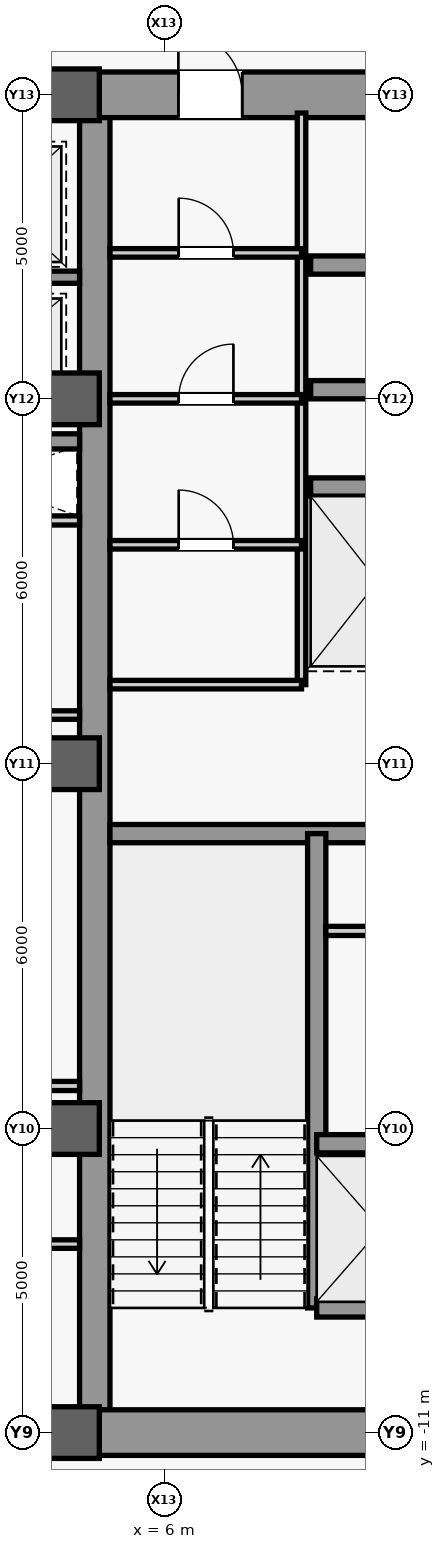
"""IFC4 building model, lengths in metres.
Left out: names, types, materials, properties, quantities, classifications, styles, units other than length and angle.
Written with IfcOpenShell. Run it as: python <this file> out.ifc"""

import sys

from ifc_helpers import new_model, si_unit, direction, frame, frame_2d, origin, origin_2d, place, context, subcontext, project, spatial, rectangle, extrude, source, transform, mapped, element, fill, save


model = new_model("IFC4")
c1 = context("Model", 3, precision=1e-05, world=origin(), true_north=direction((0.0, 1.0)))
c2 = subcontext(c1, "Body", "Model", "MODEL_VIEW")
j1 = project(units=[si_unit("LENGTHUNIT", "METRE"), si_unit("PLANEANGLEUNIT", "RADIAN")], contexts=[c1])
p1 = place(None, origin())
s1 = spatial("IfcSite", under=j1, at=p1, CompositionType="ELEMENT")
p2 = place(p1, origin())
s2 = spatial("IfcBuilding", under=s1, at=p2, CompositionType="ELEMENT")
p3 = place(p2, frame((0.0, 0.0, 155.1)))
s3 = spatial("IfcBuildingStorey", under=s2, at=p3, CompositionType="ELEMENT", Elevation=155.1)
m1 = source(origin(), c2, "Body", "SweptSolid", [
    extrude(rectangle(XDim=21.4, YDim=0.5, at=frame_2d((10.7, 0.0))), origin(), (0.0, 0.0, 1.0), 3.78),
])
p4 = place(p3, frame((4.85, -10.7, 0.0), z_axis=(0.0, 0.0, 1.0), x_axis=(0.0, 1.0, 0.0)))
e1 = element("IfcWall", 1, at=p4, inside=s3, PredefinedType="SHEAR", context=c2, shape_type="MappedRepresentation", body=[
    mapped(m1, transform((0.0, 0.0, 0.0), scale=1.0)),
])
m2 = source(origin(), c2, "Body", "SweptSolid", [
    extrude(rectangle(XDim=5.85, YDim=0.75, at=frame_2d((2.925, 0.0))), origin(), (0.0, 0.0, 1.0), 3.78),
])
p5 = place(p3, frame((4.85, -11.0, 0.0), z_axis=(0.0, 0.0, 1.0), x_axis=(1.0, 0.0, 0.0)))
e2 = element("IfcWall", 2, at=p5, inside=s3, PredefinedType="SHEAR", context=c2, shape_type="MappedRepresentation", body=[
    mapped(m2, transform((0.0, 0.0, 0.0), scale=1.0)),
])
p6 = place(p3, frame((4.85, 11.0, 0.0), z_axis=(0.0, 0.0, 1.0), x_axis=(1.0, 0.0, 0.0)))
e3 = element("IfcWall", 3, at=p6, inside=s3, PredefinedType="SHEAR", context=c2, shape_type="MappedRepresentation", body=[
    mapped(m2, transform((0.0, 0.0, 0.0), scale=1.0)),
])
m3 = source(origin(), c2, "Body", "SweptSolid", [
    extrude(rectangle(XDim=1.05, YDim=2.2, at=frame_2d((0.525, 1.1))), frame((0.0, 0.385, 0.0), z_axis=(0.0, -1.0, 0.0), x_axis=(1.0, 0.0, 0.0)), (0.0, 0.0, 1.0), 0.77),
])
p7 = place(p6, frame((1.375, 0.0, 0.0)))
e4 = element("IfcOpeningElement", 4, at=p7, cuts=e3, PredefinedType="OPENING", context=c2, shape_type="MappedRepresentation", body=[
    mapped(m3, transform((0.0, 0.0, 0.0), scale=1.0)),
])
m4 = source(origin(), c2, "Body", "SweptSolid", [
    extrude(rectangle(XDim=5.6, YDim=0.3, at=frame_2d((2.8, 0.0))), origin(), (0.0, 0.0, 1.0), 3.78),
])
p8 = place(p3, frame((5.1, -1.15, 0.0), z_axis=(0.0, 0.0, 1.0), x_axis=(1.0, 0.0, 0.0)))
e5 = element("IfcWall", 5, at=p8, inside=s3, PredefinedType="SHEAR", context=c2, shape_type="MappedRepresentation", body=[
    mapped(m4, transform((0.0, 0.0, 0.0), scale=1.0)),
])
m5 = source(origin(), c2, "Body", "SweptSolid", [
    extrude(rectangle(XDim=9.2, YDim=0.5, at=frame_2d((4.6, 0.0))), origin(), (0.0, 0.0, 1.0), 3.78),
])
p9 = place(p3, frame((-4.6, -11.0, 0.0), z_axis=(0.0, 0.0, 1.0), x_axis=(1.0, 0.0, 0.0)))
e6 = element("IfcWall", 6, at=p9, inside=s3, PredefinedType="SHEAR", context=c2, shape_type="MappedRepresentation", body=[
    mapped(m5, transform((0.0, 0.0, 0.0), scale=1.0)),
])
m6 = source(origin(), c2, "Body", "SweptSolid", [
    extrude(rectangle(XDim=1.8, YDim=2.25, at=frame_2d((0.9, 1.125))), frame((0.0, 0.26, 0.0), z_axis=(0.0, -1.0, 0.0), x_axis=(1.0, 0.0, 0.0)), (0.0, 0.0, 1.0), 0.52),
])
p10 = place(p9, frame((3.7, 0.0, 0.0)))
e7 = element("IfcOpeningElement", 7, at=p10, cuts=e6, PredefinedType="OPENING", context=c2, shape_type="MappedRepresentation", body=[
    mapped(m6, transform((0.0, 0.0, 0.0), scale=1.0)),
])
p11 = place(p3, frame((-4.6, 11.0, 0.0), z_axis=(0.0, 0.0, 1.0), x_axis=(1.0, 0.0, 0.0)))
e8 = element("IfcWall", 8, at=p11, inside=s3, PredefinedType="SHEAR", context=c2, shape_type="MappedRepresentation", body=[
    mapped(m5, transform((0.0, 0.0, 0.0), scale=1.0)),
])
p12 = place(p11, frame((3.7, 0.0, 0.0)))
e9 = element("IfcOpeningElement", 9, at=p12, cuts=e8, PredefinedType="OPENING", context=c2, shape_type="MappedRepresentation", body=[
    mapped(m6, transform((0.0, 0.0, 0.0), scale=1.0)),
])
m7 = source(origin(), c2, "Body", "SweptSolid", [
    extrude(rectangle(XDim=0.85, YDim=0.85, at=origin_2d()), origin(), (0.0, 0.0, 1.0), 4.0),
])
for number, where, z_axis, x_axis in (
    (10, (4.5, -11.0, 0.0), (0.0, 0.0, 1.0), (1.0, 0.0, 0.0)),
    (11, (4.5, -6.0, 0.0), (0.0, 0.0, 1.0), (1.0, 0.0, 0.0)),
    (12, (4.5, 0.0, 0.0), (0.0, 0.0, 1.0), (1.0, 0.0, 0.0)),
    (13, (4.5, 6.0, 0.0), (0.0, 0.0, 1.0), (1.0, 0.0, 0.0)),
    (14, (4.5, 11.0, 0.0), (0.0, 0.0, 1.0), (1.0, 0.0, 0.0)),
):
    element("IfcColumn", number, at=place(p3, frame(where, z_axis=z_axis, x_axis=x_axis)), inside=s3, PredefinedType="COLUMN", context=c2, shape_type="MappedRepresentation", body=[
        mapped(m7, transform((0.0, 0.0, 0.0), scale=1.0)),
    ])
m8 = source(origin(), c2, "Body", "SweptSolid", [
    extrude(rectangle(XDim=7.8, YDim=0.3, at=frame_2d((3.9, 0.0))), origin(), (0.0, 0.0, 1.0), 3.78),
])
p13 = place(p3, frame((8.5, -8.95, 0.0), z_axis=(0.0, 0.0, 1.0), x_axis=(0.0, 1.0, 0.0)))
e15 = element("IfcWall", 15, at=p13, inside=s3, PredefinedType="SHEAR", context=c2, shape_type="MappedRepresentation", body=[
    mapped(m8, transform((0.0, 0.0, 0.0), scale=1.0)),
])
m9 = source(origin(), c2, "Body", "SweptSolid", [
    extrude(rectangle(XDim=2.2, YDim=0.3, at=frame_2d((1.1, 0.0))), origin(), (0.0, 0.0, 1.0), 3.78),
])
for number, where, z_axis, x_axis in (
    (16, (8.5, -8.95, 0.0), (0.0, 0.0, 1.0), (1.0, 0.0, 0.0)),
    (17, (8.5, -6.25, 0.0), (0.0, 0.0, 1.0), (1.0, 0.0, 0.0)),
):
    element("IfcWall", number, at=place(p3, frame(where, z_axis=z_axis, x_axis=x_axis)), inside=s3, PredefinedType="SHEAR", context=c2, shape_type="MappedRepresentation", body=[
        mapped(m9, transform((0.0, 0.0, 0.0), scale=1.0)),
    ])
m10 = source(origin(), c2, "Body", "SweptSolid", [
    extrude(rectangle(XDim=2.3, YDim=0.3, at=frame_2d((1.15, 0.0))), origin(), (0.0, 0.0, 1.0), 3.78),
])
for number, where, z_axis, x_axis in (
    (18, (8.4, 4.55, 0.0), (0.0, 0.0, 1.0), (1.0, 0.0, 0.0)),
    (19, (8.4, 6.15, 0.0), (0.0, 0.0, 1.0), (1.0, 0.0, 0.0)),
    (20, (8.4, 8.2, 0.0), (0.0, 0.0, 1.0), (1.0, 0.0, 0.0)),
):
    element("IfcWall", number, at=place(p3, frame(where, z_axis=z_axis, x_axis=x_axis)), inside=s3, PredefinedType="SHEAR", context=c2, shape_type="MappedRepresentation", body=[
        mapped(m10, transform((0.0, 0.0, 0.0), scale=1.0)),
    ])
m11 = source(origin(), c2, "Body", "SweptSolid", [
    extrude(rectangle(XDim=2.05, YDim=0.15, at=frame_2d((1.025, 0.0))), origin(), (0.0, 0.0, 1.0), 3.78),
])
p14 = place(p3, frame((8.65, -2.75, 0.0), z_axis=(0.0, 0.0, 1.0), x_axis=(1.0, 0.0, 0.0)))
e21 = element("IfcWall", 21, at=p14, inside=s3, PredefinedType="PARTITIONING", context=c2, shape_type="MappedRepresentation", body=[
    mapped(m11, transform((0.0, 0.0, 0.0), scale=1.0)),
])
m12 = source(origin(), c2, "Body", "SweptSolid", [
    extrude(rectangle(XDim=9.4, YDim=0.14, at=frame_2d((4.7, 0.0))), origin(), (0.0, 0.0, 1.0), 3.78),
])
p15 = place(p3, frame((8.25, 1.3, 0.0), z_axis=(0.0, 0.0, 1.0), x_axis=(0.0, 1.0, 0.0)))
e22 = element("IfcWall", 22, at=p15, inside=s3, PredefinedType="PARTITIONING", context=c2, shape_type="MappedRepresentation", body=[
    mapped(m12, transform((0.0, 0.0, 0.0), scale=1.0)),
])
m13 = source(origin(), c2, "Body", "SweptSolid", [
    extrude(rectangle(XDim=3.15, YDim=0.14, at=frame_2d((1.575, 0.0))), origin(), (0.0, 0.0, 1.0), 3.78),
])
p16 = place(p3, frame((5.1, 1.3, 0.0), z_axis=(0.0, 0.0, 1.0), x_axis=(1.0, 0.0, 0.0)))
e23 = element("IfcWall", 23, at=p16, inside=s3, PredefinedType="PARTITIONING", context=c2, shape_type="MappedRepresentation", body=[
    mapped(m13, transform((0.0, 0.0, 0.0), scale=1.0)),
])
p17 = place(p3, frame((5.1, 8.4, 0.0), z_axis=(0.0, 0.0, 1.0), x_axis=(1.0, 0.0, 0.0)))
e24 = element("IfcWall", 24, at=p17, inside=s3, PredefinedType="PARTITIONING", context=c2, shape_type="MappedRepresentation", body=[
    mapped(m13, transform((0.0, 0.0, 0.0), scale=1.0)),
])
m14 = source(origin(), c2, "Body", "SweptSolid", [
    extrude(rectangle(XDim=0.9, YDim=2.15, at=frame_2d((0.45, 1.075))), frame((0.0, 0.08, 0.0), z_axis=(0.0, -1.0, 0.0), x_axis=(1.0, 0.0, 0.0)), (0.0, 0.0, 1.0), 0.16),
])
p18 = place(p17, frame((1.13, 0.0, 0.0)))
e25 = element("IfcOpeningElement", 25, at=p18, cuts=e24, PredefinedType="OPENING", context=c2, shape_type="MappedRepresentation", body=[
    mapped(m14, transform((0.0, 0.0, 0.0), scale=1.0)),
])
p19 = place(p3, frame((5.1, 6.0, 0.0), z_axis=(0.0, 0.0, 1.0), x_axis=(1.0, 0.0, 0.0)))
e26 = element("IfcWall", 26, at=p19, inside=s3, PredefinedType="PARTITIONING", context=c2, shape_type="MappedRepresentation", body=[
    mapped(m13, transform((0.0, 0.0, 0.0), scale=1.0)),
])
p20 = place(p19, frame((1.13, 0.0, 0.0)))
e27 = element("IfcOpeningElement", 27, at=p20, cuts=e26, PredefinedType="OPENING", context=c2, shape_type="MappedRepresentation", body=[
    mapped(m14, transform((0.0, 0.0, 0.0), scale=1.0)),
])
p21 = place(p3, frame((5.1, 3.6, 0.0), z_axis=(0.0, 0.0, 1.0), x_axis=(1.0, 0.0, 0.0)))
e28 = element("IfcWall", 28, at=p21, inside=s3, PredefinedType="PARTITIONING", context=c2, shape_type="MappedRepresentation", body=[
    mapped(m13, transform((0.0, 0.0, 0.0), scale=1.0)),
])
p22 = place(p21, frame((1.13, 0.0, 0.0)))
e29 = element("IfcOpeningElement", 29, at=p22, cuts=e28, PredefinedType="OPENING", context=c2, shape_type="MappedRepresentation", body=[
    mapped(m14, transform((0.0, 0.0, 0.0), scale=1.0)),
])
m15 = source(origin(), c2, "Body", "SweptSolid", [
    extrude(rectangle(XDim=3.45, YDim=0.15, at=frame_2d((1.725, 0.0))), origin(), (0.0, 0.0, 1.0), 3.78),
])
p23 = place(p3, frame((1.15, 4.0, 0.0), z_axis=(0.0, 0.0, 1.0), x_axis=(1.0, 0.0, 0.0)))
e30 = element("IfcWall", 30, at=p23, inside=s3, PredefinedType="PARTITIONING", context=c2, shape_type="MappedRepresentation", body=[
    mapped(m15, transform((0.0, 0.0, 0.0), scale=1.0)),
])
m16 = source(origin(), c2, "Body", "SweptSolid", [
    extrude(rectangle(XDim=3.45, YDim=0.14, at=frame_2d((1.725, 0.0))), origin(), (0.0, 0.0, 1.0), 3.78),
])
p24 = place(p3, frame((1.15, -7.9, 0.0), z_axis=(0.0, 0.0, 1.0), x_axis=(1.0, 0.0, 0.0)))
e31 = element("IfcWall", 31, at=p24, inside=s3, PredefinedType="PARTITIONING", context=c2, shape_type="MappedRepresentation", body=[
    mapped(m16, transform((0.0, 0.0, 0.0), scale=1.0)),
])
p25 = place(p3, frame((1.15, -5.3, 0.0), z_axis=(0.0, 0.0, 1.0), x_axis=(1.0, 0.0, 0.0)))
e32 = element("IfcWall", 32, at=p25, inside=s3, PredefinedType="PARTITIONING", context=c2, shape_type="MappedRepresentation", body=[
    mapped(m15, transform((0.0, 0.0, 0.0), scale=1.0)),
])
m17 = source(origin(), c2, "Body", "SweptSolid", [
    extrude(rectangle(XDim=2.45, YDim=0.2, at=frame_2d((1.225, 0.0))), origin(), (0.0, 0.0, 1.0), 3.78),
])
p26 = place(p3, frame((2.15, 8.0, 0.0), z_axis=(0.0, 0.0, 1.0), x_axis=(1.0, 0.0, 0.0)))
e33 = element("IfcWall", 33, at=p26, inside=s3, PredefinedType="SHEAR", context=c2, shape_type="MappedRepresentation", body=[
    mapped(m17, transform((0.0, 0.0, 0.0), scale=1.0)),
])
m18 = source(origin(), c2, "Body", "SweptSolid", [
    extrude(rectangle(XDim=9.2, YDim=0.25, at=frame_2d((4.6, 0.0))), origin(), (0.0, 0.0, 1.0), 3.78),
])
p27 = place(p3, frame((-4.6, 5.3, 0.0), z_axis=(0.0, 0.0, 1.0), x_axis=(1.0, 0.0, 0.0)))
e34 = element("IfcWall", 34, at=p27, inside=s3, PredefinedType="SHEAR", context=c2, shape_type="MappedRepresentation", body=[
    mapped(m18, transform((0.0, 0.0, 0.0), scale=1.0)),
])
m19 = source(origin(), c2, "Body", "SweptSolid", [
    extrude(rectangle(XDim=1.05, YDim=2.2, at=frame_2d((0.525, 1.1))), frame((0.0, 0.135, 0.0), z_axis=(0.0, -1.0, 0.0), x_axis=(1.0, 0.0, 0.0)), (0.0, 0.0, 1.0), 0.27),
])
p28 = place(p27, frame((4.075, 0.0, 0.0)))
e35 = element("IfcOpeningElement", 35, at=p28, cuts=e34, PredefinedType="OPENING", context=c2, shape_type="MappedRepresentation", body=[
    mapped(m19, transform((0.0, 0.0, 0.0), scale=1.0)),
])
p29 = place(p3, frame((1.15, 0.8, 0.0), z_axis=(0.0, 0.0, 1.0), x_axis=(1.0, 0.0, 0.0)))
e36 = element("IfcWall", 36, at=p29, inside=s3, PredefinedType="PARTITIONING", context=c2, shape_type="MappedRepresentation", body=[
    mapped(m16, transform((0.0, 0.0, 0.0), scale=1.0)),
])
m20 = source(origin(), c2, "Body", "SweptSolid", [
    extrude(rectangle(XDim=1.05, YDim=2.2, at=frame_2d((0.525, 1.1))), frame((0.0, 0.025, 0.0), z_axis=(0.0, -1.0, 0.0), x_axis=(1.0, 0.0, 0.0)), (0.0, 0.0, 1.0), 0.05),
])
p30 = place(p7, origin())
e37 = element("IfcDoor", 37, at=p30, inside=s3, OperationType="SINGLE_SWING_LEFT", PredefinedType="DOOR", context=c2, shape_type="MappedRepresentation", body=[
    mapped(m20, transform((0.0, 0.0, 0.0), scale=1.0)),
])
fill(e4, e37)
m21 = source(origin(), c2, "Body", "SweptSolid", [
    extrude(rectangle(XDim=0.9, YDim=2.15, at=frame_2d((0.45, 1.075))), frame((0.0, 0.025, 0.0), z_axis=(0.0, -1.0, 0.0), x_axis=(1.0, 0.0, 0.0)), (0.0, 0.0, 1.0), 0.05),
])
p31 = place(p18, origin())
e38 = element("IfcDoor", 38, at=p31, inside=s3, OperationType="SINGLE_SWING_LEFT", PredefinedType="DOOR", context=c2, shape_type="MappedRepresentation", body=[
    mapped(m21, transform((0.0, 0.0, 0.0), scale=1.0)),
])
fill(e25, e38)
p32 = place(p20, origin())
e39 = element("IfcDoor", 39, at=p32, inside=s3, OperationType="SINGLE_SWING_RIGHT", PredefinedType="DOOR", context=c2, shape_type="MappedRepresentation", body=[
    mapped(m21, transform((0.0, 0.0, 0.0), scale=1.0)),
])
fill(e27, e39)
p33 = place(p22, origin())
e40 = element("IfcDoor", 40, at=p33, inside=s3, OperationType="SINGLE_SWING_LEFT", PredefinedType="DOOR", context=c2, shape_type="MappedRepresentation", body=[
    mapped(m21, transform((0.0, 0.0, 0.0), scale=1.0)),
])
fill(e29, e40)
save(model, sys.argv[1])
